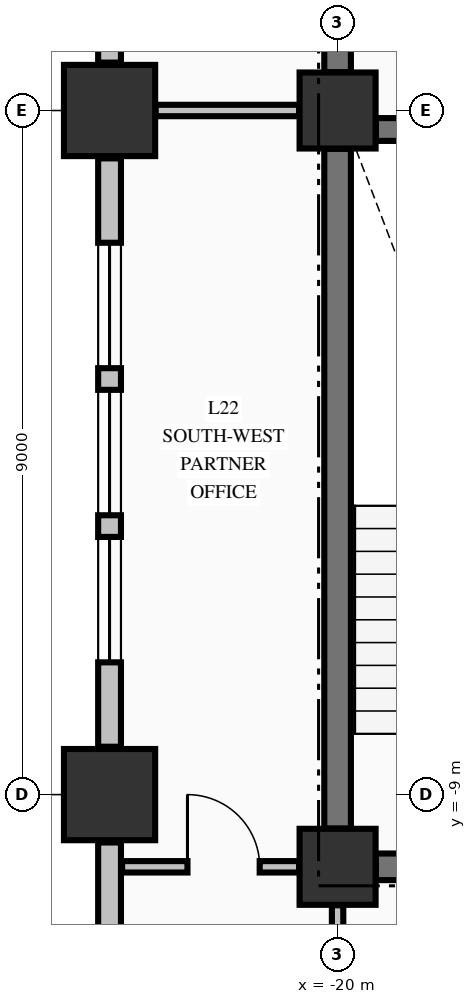
"""IFC4 building model, lengths in metres.
Left out: names, types, materials, properties, quantities, classifications, styles, units other than length and angle.
Written with IfcOpenShell. Run it as: python <this file> out.ifc"""

import sys

from ifc_helpers import new_model, si_unit, direction, frame, frame_2d, origin, origin_2d, place, context, subcontext, project, spatial, rectangle, extrude, element, fill, save


model = new_model("IFC4")
c1 = context("Model", 3, precision=1e-05, world=origin(), true_north=direction((0.0, 1.0)))
c2 = subcontext(c1, "Body", "Model", "MODEL_VIEW")
j1 = project(units=[si_unit("LENGTHUNIT", "METRE"), si_unit("PLANEANGLEUNIT", "RADIAN")], contexts=[c1])
p1 = place(None, origin())
s1 = spatial("IfcSite", under=j1, at=p1, CompositionType="ELEMENT")
p2 = place(p1, origin())
s2 = spatial("IfcBuilding", under=s1, at=p2, CompositionType="ELEMENT")
p3 = place(p2, frame((0.0, 0.0, 91.36)))
s3 = spatial("IfcBuildingStorey", under=s2, at=p3, CompositionType="ELEMENT", Elevation=91.36)
for number, where, z_axis, x_axis in (
    (1, (-23.0, -9.0, -0.25), (0.0, 0.0, 1.0), (1.0, 0.0, 0.0)),
    (2, (-23.0, 0.0, -0.25), (0.0, 0.0, 1.0), (1.0, 0.0, 0.0)),
):
    element("IfcColumn", number, at=place(p3, frame(where, z_axis=z_axis, x_axis=x_axis)), inside=s3, PredefinedType="COLUMN", context=c2, shape_type="SweptSolid", body=[
        extrude(rectangle(XDim=1.2, YDim=1.2, at=origin_2d()), origin(), (0.0, 0.0, 1.0), 3.57),
    ])
for number, where, z_axis, x_axis in (
    (3, (-20.0, -9.95, -0.25), (0.0, 0.0, 1.0), (1.0, 0.0, 0.0)),
    (4, (-20.0, 0.0, -0.25), (0.0, 0.0, 1.0), (1.0, 0.0, 0.0)),
):
    element("IfcColumn", number, at=place(p3, frame(where, z_axis=z_axis, x_axis=x_axis)), inside=s3, PredefinedType="COLUMN", context=c2, shape_type="SweptSolid", body=[
        extrude(rectangle(XDim=1.0, YDim=1.0, at=origin_2d()), origin(), (0.0, 0.0, 1.0), 3.57),
    ])
p4 = place(p3, frame((-23.0, -9.63, 0.0), z_axis=(0.0, 0.0, 1.0), x_axis=(0.0, -1.0, 0.0)))
e5 = element("IfcWall", 5, at=p4, inside=s3, PredefinedType="STANDARD", context=c2, shape_type="SweptSolid", body=[
    extrude(rectangle(XDim=10.74, YDim=0.3, at=frame_2d((5.37, 0.0))), origin(), (0.0, 0.0, 1.0), 2.712),
])
p5 = place(p3, frame((-23.0, -0.63, 0.0), z_axis=(0.0, 0.0, 1.0), x_axis=(0.0, -1.0, 0.0)))
e6 = element("IfcWall", 6, at=p5, inside=s3, PredefinedType="STANDARD", context=c2, shape_type="SweptSolid", body=[
    extrude(rectangle(XDim=7.74, YDim=0.3, at=frame_2d((3.87, 0.0))), origin(), (0.0, 0.0, 1.0), 2.712),
])
p6 = place(p5, frame((1.11, 0.0, 0.8)))
e7 = element("IfcOpeningElement", 7, at=p6, cuts=e6, PredefinedType="OPENING", context=c2, shape_type="SweptSolid", body=[
    extrude(rectangle(XDim=1.65, YDim=1.7, at=frame_2d((0.825, 0.85))), frame((0.0, 0.16, 0.0), z_axis=(0.0, -1.0, 0.0), x_axis=(1.0, 0.0, 0.0)), (0.0, 0.0, 1.0), 0.32),
])
p7 = place(p5, frame((3.045, 0.0, 0.8)))
e8 = element("IfcOpeningElement", 8, at=p7, cuts=e6, PredefinedType="OPENING", context=c2, shape_type="SweptSolid", body=[
    extrude(rectangle(XDim=1.65, YDim=1.7, at=frame_2d((0.825, 0.85))), frame((0.0, 0.16, 0.0), z_axis=(0.0, -1.0, 0.0), x_axis=(1.0, 0.0, 0.0)), (0.0, 0.0, 1.0), 0.32),
])
p8 = place(p5, frame((4.98, 0.0, 0.8)))
e9 = element("IfcOpeningElement", 9, at=p8, cuts=e6, PredefinedType="OPENING", context=c2, shape_type="SweptSolid", body=[
    extrude(rectangle(XDim=1.65, YDim=1.7, at=frame_2d((0.825, 0.85))), frame((0.0, 0.16, 0.0), z_axis=(0.0, -1.0, 0.0), x_axis=(1.0, 0.0, 0.0)), (0.0, 0.0, 1.0), 0.32),
])
p9 = place(p3, frame((-23.0, 8.37, 0.0), z_axis=(0.0, 0.0, 1.0), x_axis=(0.0, -1.0, 0.0)))
e10 = element("IfcWall", 10, at=p9, inside=s3, PredefinedType="STANDARD", context=c2, shape_type="SweptSolid", body=[
    extrude(rectangle(XDim=7.74, YDim=0.3, at=frame_2d((3.87, 0.0))), origin(), (0.0, 0.0, 1.0), 2.712),
])
p10 = place(p9, frame((1.11, 0.0, 0.8)))
e11 = element("IfcOpeningElement", 11, at=p10, cuts=e10, PredefinedType="OPENING", context=c2, shape_type="SweptSolid", body=[
    extrude(rectangle(XDim=1.65, YDim=1.7, at=frame_2d((0.825, 0.85))), frame((0.0, 0.16, 0.0), z_axis=(0.0, -1.0, 0.0), x_axis=(1.0, 0.0, 0.0)), (0.0, 0.0, 1.0), 0.32),
])
p11 = place(p9, frame((3.045, 0.0, 0.8)))
e12 = element("IfcOpeningElement", 12, at=p11, cuts=e10, PredefinedType="OPENING", context=c2, shape_type="SweptSolid", body=[
    extrude(rectangle(XDim=1.65, YDim=1.7, at=frame_2d((0.825, 0.85))), frame((0.0, 0.16, 0.0), z_axis=(0.0, -1.0, 0.0), x_axis=(1.0, 0.0, 0.0)), (0.0, 0.0, 1.0), 0.32),
])
p12 = place(p9, frame((4.98, 0.0, 0.8)))
e13 = element("IfcOpeningElement", 13, at=p12, cuts=e10, PredefinedType="OPENING", context=c2, shape_type="SweptSolid", body=[
    extrude(rectangle(XDim=1.65, YDim=1.7, at=frame_2d((0.825, 0.85))), frame((0.0, 0.16, 0.0), z_axis=(0.0, -1.0, 0.0), x_axis=(1.0, 0.0, 0.0)), (0.0, 0.0, 1.0), 0.32),
])
p13 = place(p3, frame((-19.496, -9.95, 0.0), z_axis=(0.0, 0.0, 1.0), x_axis=(1.0, 0.0, 0.0)))
e14 = element("IfcWall", 14, at=p13, inside=s3, PredefinedType="SHEAR", context=c2, shape_type="SweptSolid", body=[
    extrude(rectangle(XDim=4.796, YDim=0.35, at=frame_2d((2.398, 0.0))), origin(), (0.0, 0.0, 1.0), 3.32),
])
p14 = place(p13, frame((0.671, 0.0, 0.0)))
e15 = element("IfcOpeningElement", 15, at=p14, cuts=e14, PredefinedType="OPENING", context=c2, shape_type="SweptSolid", body=[
    extrude(rectangle(XDim=1.05, YDim=2.15, at=frame_2d((0.525, 1.075))), frame((0.0, 0.185, 0.0), z_axis=(0.0, -1.0, 0.0), x_axis=(1.0, 0.0, 0.0)), (0.0, 0.0, 1.0), 0.37),
])
p15 = place(p3, frame((-19.496, -0.25, 0.0), z_axis=(0.0, 0.0, 1.0), x_axis=(1.0, 0.0, 0.0)))
e16 = element("IfcWall", 16, at=p15, inside=s3, PredefinedType="SHEAR", context=c2, shape_type="SweptSolid", body=[
    extrude(rectangle(XDim=7.992, YDim=0.3, at=frame_2d((3.996, 0.0))), origin(), (0.0, 0.0, 1.0), 3.32),
])
p16 = place(p15, frame((5.796, 0.0, 0.0)))
e17 = element("IfcOpeningElement", 17, at=p16, cuts=e16, PredefinedType="OPENING", context=c2, shape_type="SweptSolid", body=[
    extrude(rectangle(XDim=1.1, YDim=2.15, at=frame_2d((0.55, 1.075))), frame((0.0, 0.16, 0.0), z_axis=(0.0, -1.0, 0.0), x_axis=(1.0, 0.0, 0.0)), (0.0, 0.0, 1.0), 0.32),
])
p17 = place(p3, frame((-22.835, -9.95, 0.0), z_axis=(0.0, 0.0, 1.0), x_axis=(1.0, 0.0, 0.0)))
e18 = element("IfcWall", 18, at=p17, inside=s3, PredefinedType="PARTITIONING", context=c2, shape_type="SweptSolid", body=[
    extrude(rectangle(XDim=2.329, YDim=0.15, at=frame_2d((1.165, 0.0))), origin(), (0.0, 0.0, 1.0), 3.32),
])
p18 = place(p17, frame((0.86, 0.0, 0.0)))
e19 = element("IfcOpeningElement", 19, at=p18, cuts=e18, PredefinedType="OPENING", context=c2, shape_type="SweptSolid", body=[
    extrude(rectangle(XDim=0.95, YDim=2.15, at=frame_2d((0.475, 1.075))), frame((0.0, 0.085, 0.0), z_axis=(0.0, -1.0, 0.0), x_axis=(1.0, 0.0, 0.0)), (0.0, 0.0, 1.0), 0.17),
])
p19 = place(p3, frame((-22.394, 0.0, 0.0), z_axis=(0.0, 0.0, 1.0), x_axis=(1.0, 0.0, 0.0)))
e20 = element("IfcWall", 20, at=p19, inside=s3, PredefinedType="PARTITIONING", context=c2, shape_type="SweptSolid", body=[
    extrude(rectangle(XDim=1.888, YDim=0.15, at=frame_2d((0.944, 0.0))), origin(), (0.0, 0.0, 1.0), 2.81),
])
p20 = place(p3, frame((-20.0, -9.446, 0.0), z_axis=(0.0, 0.0, 1.0), x_axis=(0.0, 1.0, 0.0)))
e21 = element("IfcWall", 21, at=p20, inside=s3, PredefinedType="SHEAR", context=c2, shape_type="SweptSolid", body=[
    extrude(rectangle(XDim=8.942, YDim=0.35, at=frame_2d((4.471, 0.0))), origin(), (0.0, 0.0, 1.0), 3.32),
])
p21 = place(p3, frame((-20.0, 0.504, 0.0), z_axis=(0.0, 0.0, 1.0), x_axis=(0.0, 1.0, 0.0)))
e22 = element("IfcWall", 22, at=p21, inside=s3, PredefinedType="SHEAR", context=c2, shape_type="SweptSolid", body=[
    extrude(rectangle(XDim=9.492, YDim=0.35, at=frame_2d((4.746, 0.0))), origin(), (0.0, 0.0, 1.0), 3.32),
])
p22 = place(p3, frame((-20.0, -12.472, 0.0), z_axis=(0.0, 0.0, 1.0), x_axis=(0.0, 1.0, 0.0)))
e23 = element("IfcWall", 23, at=p22, inside=s3, PredefinedType="PARTITIONING", context=c2, shape_type="SweptSolid", body=[
    extrude(rectangle(XDim=2.016, YDim=0.15, at=frame_2d((1.008, 0.0))), origin(), (0.0, 0.0, 1.0), 2.81),
])
p23 = place(p22, frame((0.747, 0.0, 0.0)))
e24 = element("IfcOpeningElement", 24, at=p23, cuts=e23, PredefinedType="OPENING", context=c2, shape_type="SweptSolid", body=[
    extrude(rectangle(XDim=0.95, YDim=2.15, at=frame_2d((0.475, 1.075))), frame((0.0, 0.085, 0.0), z_axis=(0.0, -1.0, 0.0), x_axis=(1.0, 0.0, 0.0)), (0.0, 0.0, 1.0), 0.17),
])
p24 = place(p6, origin())
e25 = element("IfcWindow", 25, at=p24, inside=s3, PartitioningType="SINGLE_PANEL", PredefinedType="WINDOW", context=c2, shape_type="SweptSolid", body=[
    extrude(rectangle(XDim=1.65, YDim=1.7, at=frame_2d((0.825, 0.85))), frame((0.0, 0.03, 0.0), z_axis=(0.0, -1.0, 0.0), x_axis=(1.0, 0.0, 0.0)), (0.0, 0.0, 1.0), 0.06),
])
fill(e7, e25)
p25 = place(p7, origin())
e26 = element("IfcWindow", 26, at=p25, inside=s3, PartitioningType="SINGLE_PANEL", PredefinedType="WINDOW", context=c2, shape_type="SweptSolid", body=[
    extrude(rectangle(XDim=1.65, YDim=1.7, at=frame_2d((0.825, 0.85))), frame((0.0, 0.03, 0.0), z_axis=(0.0, -1.0, 0.0), x_axis=(1.0, 0.0, 0.0)), (0.0, 0.0, 1.0), 0.06),
])
fill(e8, e26)
p26 = place(p8, origin())
e27 = element("IfcWindow", 27, at=p26, inside=s3, PartitioningType="SINGLE_PANEL", PredefinedType="WINDOW", context=c2, shape_type="SweptSolid", body=[
    extrude(rectangle(XDim=1.65, YDim=1.7, at=frame_2d((0.825, 0.85))), frame((0.0, 0.03, 0.0), z_axis=(0.0, -1.0, 0.0), x_axis=(1.0, 0.0, 0.0)), (0.0, 0.0, 1.0), 0.06),
])
fill(e9, e27)
p27 = place(p18, origin())
e28 = element("IfcDoor", 28, at=p27, inside=s3, OperationType="SINGLE_SWING_LEFT", PredefinedType="DOOR", context=c2, shape_type="SweptSolid", body=[
    extrude(rectangle(XDim=0.95, YDim=2.15, at=frame_2d((0.475, 1.075))), frame((0.0, 0.025, 0.0), z_axis=(0.0, -1.0, 0.0), x_axis=(1.0, 0.0, 0.0)), (0.0, 0.0, 1.0), 0.05),
])
fill(e19, e28)
save(model, sys.argv[1])
